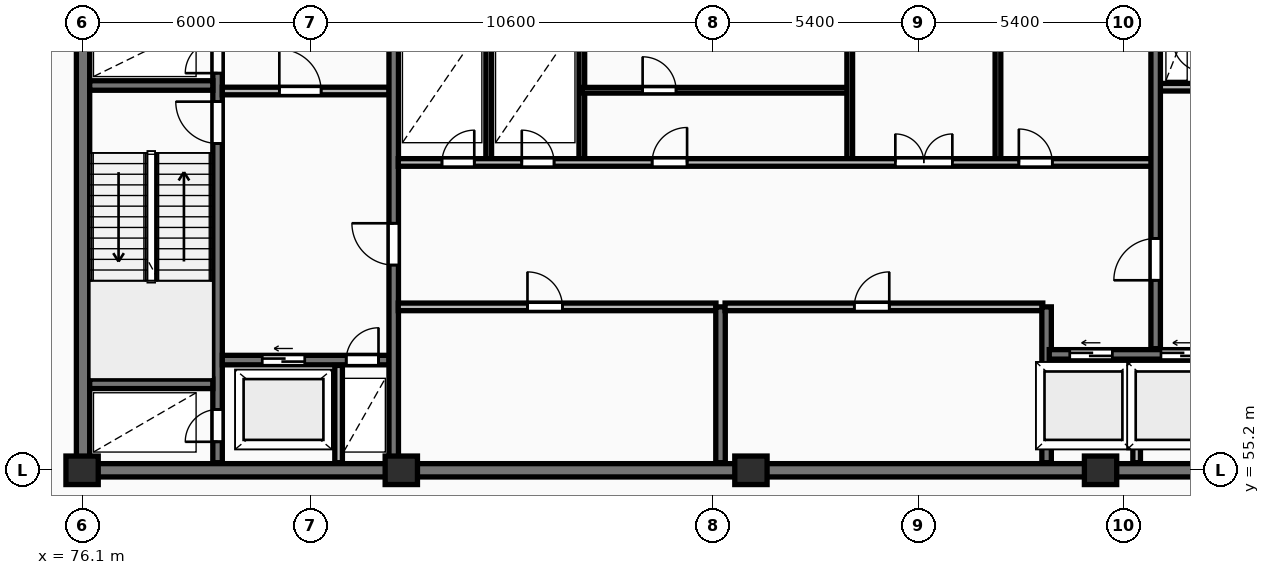
"""IFC4 building model, lengths in metres.
Left out: names, types, materials, properties, quantities, classifications, styles, units other than length and angle.
Written with IfcOpenShell. Run it as: python <this file> out.ifc"""

import sys

from ifc_helpers import new_model, si_unit, direction, frame, frame_2d, origin, origin_2d, place, context, subcontext, project, spatial, rectangle, extrude, element, fill, save


model = new_model("IFC4")
c1 = context("Model", 3, precision=1e-05, world=origin(), true_north=direction((0.0, 1.0)))
c2 = subcontext(c1, "Body", "Model", "MODEL_VIEW")
j1 = project(units=[si_unit("LENGTHUNIT", "METRE"), si_unit("PLANEANGLEUNIT", "RADIAN")], contexts=[c1])
p1 = place(None, origin())
s1 = spatial("IfcSite", under=j1, at=p1, CompositionType="ELEMENT")
p2 = place(p1, origin())
s2 = spatial("IfcBuilding", under=s1, at=p2, CompositionType="ELEMENT")
p3 = place(p2, frame((0.0, 0.0, 223.85)))
s3 = spatial("IfcBuildingStorey", under=s2, at=p3, CompositionType="ELEMENT", Elevation=223.85)
for number, where, z_axis, x_axis in (
    (1, (76.1, 55.2, 0.0), (0.0, 0.0, 1.0), (1.0, 0.0, 0.0)),
    (2, (84.5, 55.2, 0.0), (0.0, 0.0, 1.0), (1.0, 0.0, 0.0)),
    (3, (93.7, 55.2, 0.0), (0.0, 0.0, 1.0), (1.0, 0.0, 0.0)),
    (4, (102.9, 55.2, 0.0), (0.0, 0.0, 1.0), (1.0, 0.0, 0.0)),
):
    element("IfcColumn", number, at=place(p3, frame(where, z_axis=z_axis, x_axis=x_axis)), inside=s3, PredefinedType="COLUMN", context=c2, shape_type="SweptSolid", body=[
        extrude(rectangle(XDim=0.85, YDim=0.75, at=origin_2d()), origin(), (0.0, 0.0, 1.0), 4.8),
    ])
p4 = place(p3, frame((75.95, 55.2, 0.0), z_axis=(0.0, 0.0, 1.0), x_axis=(1.0, 0.0, 0.0)))
e5 = element("IfcWall", 5, at=p4, inside=s3, PredefinedType="SHEAR", context=c2, shape_type="SweptSolid", body=[
    extrude(rectangle(XDim=36.3, YDim=0.35, at=frame_2d((18.15, 0.0))), origin(), (0.0, 0.0, 1.0), 4.8),
])
p5 = place(p3, frame((76.125, 55.375, 0.0), z_axis=(0.0, 0.0, 1.0), x_axis=(0.0, 1.0, 0.0)))
e6 = element("IfcWall", 6, at=p5, inside=s3, PredefinedType="SHEAR", context=c2, shape_type="SweptSolid", body=[
    extrude(rectangle(XDim=11.65, YDim=0.35, at=frame_2d((5.825, 0.0))), origin(), (0.0, 0.0, 1.0), 4.8),
])
p6 = place(p3, frame((79.665, 55.4, 0.0), z_axis=(0.0, 0.0, 1.0), x_axis=(0.0, 1.0, 0.0)))
e7 = element("IfcWall", 7, at=p6, inside=s3, PredefinedType="SHEAR", context=c2, shape_type="SweptSolid", body=[
    extrude(rectangle(XDim=11.6, YDim=0.25, at=frame_2d((5.8, 0.0))), origin(), (0.0, 0.0, 1.0), 4.8),
])
p7 = place(p6, frame((0.55, 0.0, 0.0)))
e8 = element("IfcOpeningElement", 8, at=p7, cuts=e7, PredefinedType="OPENING", context=c2, shape_type="SweptSolid", body=[
    extrude(rectangle(XDim=0.85, YDim=2.05, at=frame_2d((0.425, 1.025))), frame((0.0, 0.135, 0.0), z_axis=(0.0, -1.0, 0.0), x_axis=(1.0, 0.0, 0.0)), (0.0, 0.0, 1.0), 0.27),
])
p8 = place(p6, frame((8.4, 0.0, 0.0)))
e9 = element("IfcOpeningElement", 9, at=p8, cuts=e7, PredefinedType="OPENING", context=c2, shape_type="SweptSolid", body=[
    extrude(rectangle(XDim=1.1, YDim=2.1, at=frame_2d((0.55, 1.05))), frame((0.0, 0.135, 0.0), z_axis=(0.0, -1.0, 0.0), x_axis=(1.0, 0.0, 0.0)), (0.0, 0.0, 1.0), 0.27),
])
p9 = place(p6, frame((10.25, 0.0, 0.0)))
e10 = element("IfcOpeningElement", 10, at=p9, cuts=e7, PredefinedType="OPENING", context=c2, shape_type="SweptSolid", body=[
    extrude(rectangle(XDim=0.85, YDim=2.05, at=frame_2d((0.425, 1.025))), frame((0.0, 0.135, 0.0), z_axis=(0.0, -1.0, 0.0), x_axis=(1.0, 0.0, 0.0)), (0.0, 0.0, 1.0), 0.27),
])
for number, where, z_axis, x_axis in (
    (11, (76.3, 57.475, 0.0), (0.0, 0.0, 1.0), (1.0, 0.0, 0.0)),
    (12, (76.3, 65.325, 0.0), (0.0, 0.0, 1.0), (1.0, 0.0, 0.0)),
):
    element("IfcWall", number, at=place(p3, frame(where, z_axis=z_axis, x_axis=x_axis)), inside=s3, PredefinedType="SHEAR", context=c2, shape_type="SweptSolid", body=[
        extrude(rectangle(XDim=3.24, YDim=0.25, at=frame_2d((1.62, 0.0))), origin(), (0.0, 0.0, 1.0), 4.8),
    ])
p10 = place(p3, frame((79.79, 58.1, 0.0), z_axis=(0.0, 0.0, 1.0), x_axis=(1.0, 0.0, 0.0)))
e13 = element("IfcWall", 13, at=p10, inside=s3, PredefinedType="SHEAR", context=c2, shape_type="SweptSolid", body=[
    extrude(rectangle(XDim=4.39, YDim=0.25, at=frame_2d((2.195, 0.0))), origin(), (0.0, 0.0, 1.0), 4.8),
])
p11 = place(p10, frame((1.05, 0.0, 0.0)))
e14 = element("IfcOpeningElement", 14, at=p11, cuts=e13, PredefinedType="OPENING", context=c2, shape_type="SweptSolid", body=[
    extrude(rectangle(XDim=1.12, YDim=2.12, at=frame_2d((0.56, 1.06))), frame((0.0, 0.135, 0.0), z_axis=(0.0, -1.0, 0.0), x_axis=(1.0, 0.0, 0.0)), (0.0, 0.0, 1.0), 0.27),
])
p12 = place(p10, frame((3.26, 0.0, 0.0)))
e15 = element("IfcOpeningElement", 15, at=p12, cuts=e13, PredefinedType="OPENING", context=c2, shape_type="SweptSolid", body=[
    extrude(rectangle(XDim=0.85, YDim=2.05, at=frame_2d((0.425, 1.025))), frame((0.0, 0.135, 0.0), z_axis=(0.0, -1.0, 0.0), x_axis=(1.0, 0.0, 0.0)), (0.0, 0.0, 1.0), 0.27),
])
p13 = place(p3, frame((82.85, 55.4, 0.0), z_axis=(0.0, 0.0, 1.0), x_axis=(0.0, 1.0, 0.0)))
e16 = element("IfcWall", 16, at=p13, inside=s3, PredefinedType="PARTITIONING", context=c2, shape_type="SweptSolid", body=[
    extrude(rectangle(XDim=2.56, YDim=0.2, at=frame_2d((1.28, 0.0))), origin(), (0.0, 0.0, 1.0), 4.48),
])
p14 = place(p3, frame((79.79, 65.18, 0.0), z_axis=(0.0, 0.0, 1.0), x_axis=(1.0, 0.0, 0.0)))
e17 = element("IfcWall", 17, at=p14, inside=s3, PredefinedType="PARTITIONING", context=c2, shape_type="SweptSolid", body=[
    extrude(rectangle(XDim=4.39, YDim=0.2, at=frame_2d((2.195, 0.0))), origin(), (0.0, 0.0, 1.0), 4.48),
])
p15 = place(p14, frame((1.5, 0.0, 0.0)))
e18 = element("IfcOpeningElement", 18, at=p15, cuts=e17, PredefinedType="OPENING", context=c2, shape_type="SweptSolid", body=[
    extrude(rectangle(XDim=1.1, YDim=2.1, at=frame_2d((0.55, 1.05))), frame((0.0, 0.11, 0.0), z_axis=(0.0, -1.0, 0.0), x_axis=(1.0, 0.0, 0.0)), (0.0, 0.0, 1.0), 0.22),
])
p16 = place(p3, frame((84.3, 55.4, 0.0), z_axis=(0.0, 0.0, 1.0), x_axis=(0.0, 1.0, 0.0)))
e19 = element("IfcWall", 19, at=p16, inside=s3, PredefinedType="SHEAR", context=c2, shape_type="SweptSolid", body=[
    extrude(rectangle(XDim=11.6, YDim=0.25, at=frame_2d((5.8, 0.0))), origin(), (0.0, 0.0, 1.0), 4.8),
])
p17 = place(p16, frame((5.2, 0.0, 0.0)))
e20 = element("IfcOpeningElement", 20, at=p17, cuts=e19, PredefinedType="OPENING", context=c2, shape_type="SweptSolid", body=[
    extrude(rectangle(XDim=1.1, YDim=2.1, at=frame_2d((0.55, 1.05))), frame((0.0, 0.135, 0.0), z_axis=(0.0, -1.0, 0.0), x_axis=(1.0, 0.0, 0.0)), (0.0, 0.0, 1.0), 0.27),
])
p18 = place(p3, frame((84.42, 59.5, 0.0), z_axis=(0.0, 0.0, 1.0), x_axis=(1.0, 0.0, 0.0)))
e21 = element("IfcWall", 21, at=p18, inside=s3, PredefinedType="PARTITIONING", context=c2, shape_type="SweptSolid", body=[
    extrude(rectangle(XDim=8.36, YDim=0.2, at=frame_2d((4.18, 0.0))), origin(), (0.0, 0.0, 1.0), 4.48),
])
p19 = place(p18, frame((3.4, 0.0, 0.0)))
e22 = element("IfcOpeningElement", 22, at=p19, cuts=e21, PredefinedType="OPENING", context=c2, shape_type="SweptSolid", body=[
    extrude(rectangle(XDim=0.92, YDim=2.08, at=frame_2d((0.46, 1.04))), frame((0.0, 0.11, 0.0), z_axis=(0.0, -1.0, 0.0), x_axis=(1.0, 0.0, 0.0)), (0.0, 0.0, 1.0), 0.22),
])
p20 = place(p3, frame((92.9, 55.4, 0.0), z_axis=(0.0, 0.0, 1.0), x_axis=(0.0, 1.0, 0.0)))
e23 = element("IfcWall", 23, at=p20, inside=s3, PredefinedType="SHEAR", context=c2, shape_type="SweptSolid", body=[
    extrude(rectangle(XDim=4.1, YDim=0.25, at=frame_2d((2.05, 0.0))), origin(), (0.0, 0.0, 1.0), 4.8),
])
p21 = place(p3, frame((93.02, 59.5, 0.0), z_axis=(0.0, 0.0, 1.0), x_axis=(1.0, 0.0, 0.0)))
e24 = element("IfcWall", 24, at=p21, inside=s3, PredefinedType="PARTITIONING", context=c2, shape_type="SweptSolid", body=[
    extrude(rectangle(XDim=8.36, YDim=0.2, at=frame_2d((4.18, 0.0))), origin(), (0.0, 0.0, 1.0), 4.48),
])
p22 = place(p21, frame((3.4, 0.0, 0.0)))
e25 = element("IfcOpeningElement", 25, at=p22, cuts=e24, PredefinedType="OPENING", context=c2, shape_type="SweptSolid", body=[
    extrude(rectangle(XDim=0.92, YDim=2.08, at=frame_2d((0.46, 1.04))), frame((0.0, 0.11, 0.0), z_axis=(0.0, -1.0, 0.0), x_axis=(1.0, 0.0, 0.0)), (0.0, 0.0, 1.0), 0.22),
])
p23 = place(p3, frame((101.48, 55.4, 0.0), z_axis=(0.0, 0.0, 1.0), x_axis=(0.0, 1.0, 0.0)))
e26 = element("IfcWall", 26, at=p23, inside=s3, PredefinedType="SHEAR", context=c2, shape_type="SweptSolid", body=[
    extrude(rectangle(XDim=4.1, YDim=0.25, at=frame_2d((2.05, 0.0))), origin(), (0.0, 0.0, 1.0), 4.8),
])
p24 = place(p3, frame((103.85, 55.4, 0.0), z_axis=(0.0, 0.0, 1.0), x_axis=(0.0, 1.0, 0.0)))
e27 = element("IfcWall", 27, at=p24, inside=s3, PredefinedType="PARTITIONING", context=c2, shape_type="SweptSolid", body=[
    extrude(rectangle(XDim=2.72, YDim=0.2, at=frame_2d((1.36, 0.0))), origin(), (0.0, 0.0, 1.0), 4.48),
])
p25 = place(p3, frame((101.55, 58.25, 0.0), z_axis=(0.0, 0.0, 1.0), x_axis=(1.0, 0.0, 0.0)))
e28 = element("IfcWall", 28, at=p25, inside=s3, PredefinedType="SHEAR", context=c2, shape_type="SweptSolid", body=[
    extrude(rectangle(XDim=4.6, YDim=0.25, at=frame_2d((2.3, 0.0))), origin(), (0.0, 0.0, 1.0), 4.8),
])
p26 = place(p25, frame((0.54, 0.0, 0.0)))
e29 = element("IfcOpeningElement", 29, at=p26, cuts=e28, PredefinedType="OPENING", context=c2, shape_type="SweptSolid", body=[
    extrude(rectangle(XDim=1.12, YDim=2.12, at=frame_2d((0.56, 1.06))), frame((0.0, 0.135, 0.0), z_axis=(0.0, -1.0, 0.0), x_axis=(1.0, 0.0, 0.0)), (0.0, 0.0, 1.0), 0.27),
])
p27 = place(p25, frame((2.94, 0.0, 0.0)))
e30 = element("IfcOpeningElement", 30, at=p27, cuts=e28, PredefinedType="OPENING", context=c2, shape_type="SweptSolid", body=[
    extrude(rectangle(XDim=1.12, YDim=2.12, at=frame_2d((0.56, 1.06))), frame((0.0, 0.135, 0.0), z_axis=(0.0, -1.0, 0.0), x_axis=(1.0, 0.0, 0.0)), (0.0, 0.0, 1.0), 0.27),
])
for number, where, z_axis, x_axis in (
    (31, (86.8, 63.4, 0.0), (0.0, 0.0, 1.0), (0.0, 1.0, 0.0)),
    (32, (89.25, 63.4, 0.0), (0.0, 0.0, 1.0), (0.0, 1.0, 0.0)),
):
    element("IfcWall", number, at=place(p3, frame(where, z_axis=z_axis, x_axis=x_axis)), inside=s3, PredefinedType="PARTITIONING", context=c2, shape_type="SweptSolid", body=[
        extrude(rectangle(XDim=3.6, YDim=0.15, at=frame_2d((1.8, 0.0))), origin(), (0.0, 0.0, 1.0), 4.48),
    ])
p28 = place(p3, frame((89.25, 65.2, 0.0), z_axis=(0.0, 0.0, 1.0), x_axis=(1.0, 0.0, 0.0)))
e33 = element("IfcWall", 33, at=p28, inside=s3, PredefinedType="PARTITIONING", context=c2, shape_type="SweptSolid", body=[
    extrude(rectangle(XDim=7.05, YDim=0.15, at=frame_2d((3.525, 0.0))), origin(), (0.0, 0.0, 1.0), 4.48),
])
p29 = place(p28, frame((1.6, 0.0, 0.0)))
e34 = element("IfcOpeningElement", 34, at=p29, cuts=e33, PredefinedType="OPENING", context=c2, shape_type="SweptSolid", body=[
    extrude(rectangle(XDim=0.88, YDim=2.06, at=frame_2d((0.44, 1.03))), frame((0.0, 0.085, 0.0), z_axis=(0.0, -1.0, 0.0), x_axis=(1.0, 0.0, 0.0)), (0.0, 0.0, 1.0), 0.17),
])
for number, where, z_axis, x_axis in (
    (35, (96.3, 63.4, 0.0), (0.0, 0.0, 1.0), (0.0, 1.0, 0.0)),
    (36, (100.2, 63.4, 0.0), (0.0, 0.0, 1.0), (0.0, 1.0, 0.0)),
):
    element("IfcWall", number, at=place(p3, frame(where, z_axis=z_axis, x_axis=x_axis)), inside=s3, PredefinedType="PARTITIONING", context=c2, shape_type="SweptSolid", body=[
        extrude(rectangle(XDim=3.6, YDim=0.15, at=frame_2d((1.8, 0.0))), origin(), (0.0, 0.0, 1.0), 4.48),
    ])
p30 = place(p3, frame((84.42, 63.3, 0.0), z_axis=(0.0, 0.0, 1.0), x_axis=(1.0, 0.0, 0.0)))
e37 = element("IfcWall", 37, at=p30, inside=s3, PredefinedType="PARTITIONING", context=c2, shape_type="SweptSolid", body=[
    extrude(rectangle(XDim=19.83, YDim=0.2, at=frame_2d((9.915, 0.0))), origin(), (0.0, 0.0, 1.0), 4.48),
])
p31 = place(p30, frame((1.15, 0.0, 0.0)))
e38 = element("IfcOpeningElement", 38, at=p31, cuts=e37, PredefinedType="OPENING", context=c2, shape_type="SweptSolid", body=[
    extrude(rectangle(XDim=0.85, YDim=2.05, at=frame_2d((0.425, 1.025))), frame((0.0, 0.11, 0.0), z_axis=(0.0, -1.0, 0.0), x_axis=(1.0, 0.0, 0.0)), (0.0, 0.0, 1.0), 0.22),
])
p32 = place(p30, frame((3.25, 0.0, 0.0)))
e39 = element("IfcOpeningElement", 39, at=p32, cuts=e37, PredefinedType="OPENING", context=c2, shape_type="SweptSolid", body=[
    extrude(rectangle(XDim=0.85, YDim=2.05, at=frame_2d((0.425, 1.025))), frame((0.0, 0.11, 0.0), z_axis=(0.0, -1.0, 0.0), x_axis=(1.0, 0.0, 0.0)), (0.0, 0.0, 1.0), 0.22),
])
p33 = place(p30, frame((13.08, 0.0, 0.0)))
e40 = element("IfcOpeningElement", 40, at=p33, cuts=e37, PredefinedType="OPENING", context=c2, shape_type="SweptSolid", body=[
    extrude(rectangle(XDim=1.5, YDim=2.2, at=frame_2d((0.75, 1.1))), frame((0.0, 0.11, 0.0), z_axis=(0.0, -1.0, 0.0), x_axis=(1.0, 0.0, 0.0)), (0.0, 0.0, 1.0), 0.22),
])
p34 = place(p30, frame((6.68, 0.0, 0.0)))
e41 = element("IfcOpeningElement", 41, at=p34, cuts=e37, PredefinedType="OPENING", context=c2, shape_type="SweptSolid", body=[
    extrude(rectangle(XDim=0.92, YDim=2.08, at=frame_2d((0.46, 1.04))), frame((0.0, 0.11, 0.0), z_axis=(0.0, -1.0, 0.0), x_axis=(1.0, 0.0, 0.0)), (0.0, 0.0, 1.0), 0.22),
])
p35 = place(p30, frame((16.33, 0.0, 0.0)))
e42 = element("IfcOpeningElement", 42, at=p35, cuts=e37, PredefinedType="OPENING", context=c2, shape_type="SweptSolid", body=[
    extrude(rectangle(XDim=0.88, YDim=2.06, at=frame_2d((0.44, 1.03))), frame((0.0, 0.11, 0.0), z_axis=(0.0, -1.0, 0.0), x_axis=(1.0, 0.0, 0.0)), (0.0, 0.0, 1.0), 0.22),
])
p36 = place(p3, frame((104.45, 65.28, 0.0), z_axis=(0.0, 0.0, 1.0), x_axis=(1.0, 0.0, 0.0)))
e43 = element("IfcWall", 43, at=p36, inside=s3, PredefinedType="PARTITIONING", context=c2, shape_type="SweptSolid", body=[
    extrude(rectangle(XDim=1.2, YDim=0.2, at=frame_2d((0.6, 0.0))), origin(), (0.0, 0.0, 1.0), 4.48),
])
p37 = place(p3, frame((104.35, 58.4, 0.0), z_axis=(0.0, 0.0, 1.0), x_axis=(0.0, 1.0, 0.0)))
e44 = element("IfcWall", 44, at=p37, inside=s3, PredefinedType="SHEAR", context=c2, shape_type="SweptSolid", body=[
    extrude(rectangle(XDim=8.6, YDim=0.25, at=frame_2d((4.3, 0.0))), origin(), (0.0, 0.0, 1.0), 4.8),
])
p38 = place(p37, frame((1.8, 0.0, 0.0)))
e45 = element("IfcOpeningElement", 45, at=p38, cuts=e44, PredefinedType="OPENING", context=c2, shape_type="SweptSolid", body=[
    extrude(rectangle(XDim=1.1, YDim=2.1, at=frame_2d((0.55, 1.05))), frame((0.0, 0.135, 0.0), z_axis=(0.0, -1.0, 0.0), x_axis=(1.0, 0.0, 0.0)), (0.0, 0.0, 1.0), 0.27),
])
p39 = place(p7, origin())
e46 = element("IfcDoor", 46, at=p39, inside=s3, OperationType="SINGLE_SWING_LEFT", PredefinedType="DOOR", context=c2, shape_type="SweptSolid", body=[
    extrude(rectangle(XDim=0.85, YDim=2.05, at=frame_2d((0.425, 1.025))), frame((0.0, 0.025, 0.0), z_axis=(0.0, -1.0, 0.0), x_axis=(1.0, 0.0, 0.0)), (0.0, 0.0, 1.0), 0.05),
])
fill(e8, e46)
p40 = place(p8, origin())
e47 = element("IfcDoor", 47, at=p40, inside=s3, OperationType="SINGLE_SWING_RIGHT", PredefinedType="DOOR", context=c2, shape_type="SweptSolid", body=[
    extrude(rectangle(XDim=1.1, YDim=2.1, at=frame_2d((0.55, 1.05))), frame((0.0, 0.025, 0.0), z_axis=(0.0, -1.0, 0.0), x_axis=(1.0, 0.0, 0.0)), (0.0, 0.0, 1.0), 0.05),
])
fill(e9, e47)
p41 = place(p9, origin())
e48 = element("IfcDoor", 48, at=p41, inside=s3, OperationType="SINGLE_SWING_LEFT", PredefinedType="DOOR", context=c2, shape_type="SweptSolid", body=[
    extrude(rectangle(XDim=0.85, YDim=2.05, at=frame_2d((0.425, 1.025))), frame((0.0, 0.025, 0.0), z_axis=(0.0, -1.0, 0.0), x_axis=(1.0, 0.0, 0.0)), (0.0, 0.0, 1.0), 0.05),
])
fill(e10, e48)
p42 = place(p11, origin())
e49 = element("IfcDoor", 49, at=p42, inside=s3, OperationType="SLIDING_TO_LEFT", PredefinedType="DOOR", context=c2, shape_type="SweptSolid", body=[
    extrude(rectangle(XDim=1.12, YDim=2.12, at=frame_2d((0.56, 1.06))), frame((0.0, 0.025, 0.0), z_axis=(0.0, -1.0, 0.0), x_axis=(1.0, 0.0, 0.0)), (0.0, 0.0, 1.0), 0.05),
])
fill(e14, e49)
p43 = place(p12, origin())
e50 = element("IfcDoor", 50, at=p43, inside=s3, OperationType="SINGLE_SWING_RIGHT", PredefinedType="DOOR", context=c2, shape_type="SweptSolid", body=[
    extrude(rectangle(XDim=0.85, YDim=2.05, at=frame_2d((0.425, 1.025))), frame((0.0, 0.025, 0.0), z_axis=(0.0, -1.0, 0.0), x_axis=(1.0, 0.0, 0.0)), (0.0, 0.0, 1.0), 0.05),
])
fill(e15, e50)
p44 = place(p15, origin())
e51 = element("IfcDoor", 51, at=p44, inside=s3, OperationType="SINGLE_SWING_LEFT", PredefinedType="DOOR", context=c2, shape_type="SweptSolid", body=[
    extrude(rectangle(XDim=1.1, YDim=2.1, at=frame_2d((0.55, 1.05))), frame((0.0, 0.025, 0.0), z_axis=(0.0, -1.0, 0.0), x_axis=(1.0, 0.0, 0.0)), (0.0, 0.0, 1.0), 0.05),
])
fill(e18, e51)
p45 = place(p17, origin())
e52 = element("IfcDoor", 52, at=p45, inside=s3, OperationType="SINGLE_SWING_RIGHT", PredefinedType="DOOR", context=c2, shape_type="SweptSolid", body=[
    extrude(rectangle(XDim=1.1, YDim=2.1, at=frame_2d((0.55, 1.05))), frame((0.0, 0.025, 0.0), z_axis=(0.0, -1.0, 0.0), x_axis=(1.0, 0.0, 0.0)), (0.0, 0.0, 1.0), 0.05),
])
fill(e20, e52)
p46 = place(p19, origin())
e53 = element("IfcDoor", 53, at=p46, inside=s3, OperationType="SINGLE_SWING_LEFT", PredefinedType="DOOR", context=c2, shape_type="SweptSolid", body=[
    extrude(rectangle(XDim=0.92, YDim=2.08, at=frame_2d((0.46, 1.04))), frame((0.0, 0.025, 0.0), z_axis=(0.0, -1.0, 0.0), x_axis=(1.0, 0.0, 0.0)), (0.0, 0.0, 1.0), 0.05),
])
fill(e22, e53)
p47 = place(p22, origin())
e54 = element("IfcDoor", 54, at=p47, inside=s3, OperationType="SINGLE_SWING_RIGHT", PredefinedType="DOOR", context=c2, shape_type="SweptSolid", body=[
    extrude(rectangle(XDim=0.92, YDim=2.08, at=frame_2d((0.46, 1.04))), frame((0.0, 0.025, 0.0), z_axis=(0.0, -1.0, 0.0), x_axis=(1.0, 0.0, 0.0)), (0.0, 0.0, 1.0), 0.05),
])
fill(e25, e54)
p48 = place(p26, origin())
e55 = element("IfcDoor", 55, at=p48, inside=s3, OperationType="SLIDING_TO_LEFT", PredefinedType="DOOR", context=c2, shape_type="SweptSolid", body=[
    extrude(rectangle(XDim=1.12, YDim=2.12, at=frame_2d((0.56, 1.06))), frame((0.0, 0.025, 0.0), z_axis=(0.0, -1.0, 0.0), x_axis=(1.0, 0.0, 0.0)), (0.0, 0.0, 1.0), 0.05),
])
fill(e29, e55)
p49 = place(p27, origin())
e56 = element("IfcDoor", 56, at=p49, inside=s3, OperationType="SLIDING_TO_LEFT", PredefinedType="DOOR", context=c2, shape_type="SweptSolid", body=[
    extrude(rectangle(XDim=1.12, YDim=2.12, at=frame_2d((0.56, 1.06))), frame((0.0, 0.025, 0.0), z_axis=(0.0, -1.0, 0.0), x_axis=(1.0, 0.0, 0.0)), (0.0, 0.0, 1.0), 0.05),
])
fill(e30, e56)
p50 = place(p29, origin())
e57 = element("IfcDoor", 57, at=p50, inside=s3, OperationType="SINGLE_SWING_LEFT", PredefinedType="DOOR", context=c2, shape_type="SweptSolid", body=[
    extrude(rectangle(XDim=0.88, YDim=2.06, at=frame_2d((0.44, 1.03))), frame((0.0, 0.025, 0.0), z_axis=(0.0, -1.0, 0.0), x_axis=(1.0, 0.0, 0.0)), (0.0, 0.0, 1.0), 0.05),
])
fill(e34, e57)
p51 = place(p31, origin())
e58 = element("IfcDoor", 58, at=p51, inside=s3, OperationType="SINGLE_SWING_RIGHT", PredefinedType="DOOR", context=c2, shape_type="SweptSolid", body=[
    extrude(rectangle(XDim=0.85, YDim=2.05, at=frame_2d((0.425, 1.025))), frame((0.0, 0.025, 0.0), z_axis=(0.0, -1.0, 0.0), x_axis=(1.0, 0.0, 0.0)), (0.0, 0.0, 1.0), 0.05),
])
fill(e38, e58)
p52 = place(p32, origin())
e59 = element("IfcDoor", 59, at=p52, inside=s3, OperationType="SINGLE_SWING_LEFT", PredefinedType="DOOR", context=c2, shape_type="SweptSolid", body=[
    extrude(rectangle(XDim=0.85, YDim=2.05, at=frame_2d((0.425, 1.025))), frame((0.0, 0.025, 0.0), z_axis=(0.0, -1.0, 0.0), x_axis=(1.0, 0.0, 0.0)), (0.0, 0.0, 1.0), 0.05),
])
fill(e39, e59)
p53 = place(p33, origin())
e60 = element("IfcDoor", 60, at=p53, inside=s3, OperationType="DOUBLE_DOOR_SINGLE_SWING", PredefinedType="DOOR", context=c2, shape_type="SweptSolid", body=[
    extrude(rectangle(XDim=1.5, YDim=2.2, at=frame_2d((0.75, 1.1))), frame((0.0, 0.025, 0.0), z_axis=(0.0, -1.0, 0.0), x_axis=(1.0, 0.0, 0.0)), (0.0, 0.0, 1.0), 0.05),
])
fill(e40, e60)
p54 = place(p34, origin())
e61 = element("IfcDoor", 61, at=p54, inside=s3, OperationType="SINGLE_SWING_RIGHT", PredefinedType="DOOR", context=c2, shape_type="SweptSolid", body=[
    extrude(rectangle(XDim=0.92, YDim=2.08, at=frame_2d((0.46, 1.04))), frame((0.0, 0.025, 0.0), z_axis=(0.0, -1.0, 0.0), x_axis=(1.0, 0.0, 0.0)), (0.0, 0.0, 1.0), 0.05),
])
fill(e41, e61)
p55 = place(p35, origin())
e62 = element("IfcDoor", 62, at=p55, inside=s3, OperationType="SINGLE_SWING_LEFT", PredefinedType="DOOR", context=c2, shape_type="SweptSolid", body=[
    extrude(rectangle(XDim=0.88, YDim=2.06, at=frame_2d((0.44, 1.03))), frame((0.0, 0.025, 0.0), z_axis=(0.0, -1.0, 0.0), x_axis=(1.0, 0.0, 0.0)), (0.0, 0.0, 1.0), 0.05),
])
fill(e42, e62)
p56 = place(p38, origin())
e63 = element("IfcDoor", 63, at=p56, inside=s3, OperationType="SINGLE_SWING_LEFT", PredefinedType="DOOR", context=c2, shape_type="SweptSolid", body=[
    extrude(rectangle(XDim=1.1, YDim=2.1, at=frame_2d((0.55, 1.05))), frame((0.0, 0.025, 0.0), z_axis=(0.0, -1.0, 0.0), x_axis=(1.0, 0.0, 0.0)), (0.0, 0.0, 1.0), 0.05),
])
fill(e45, e63)
save(model, sys.argv[1])
